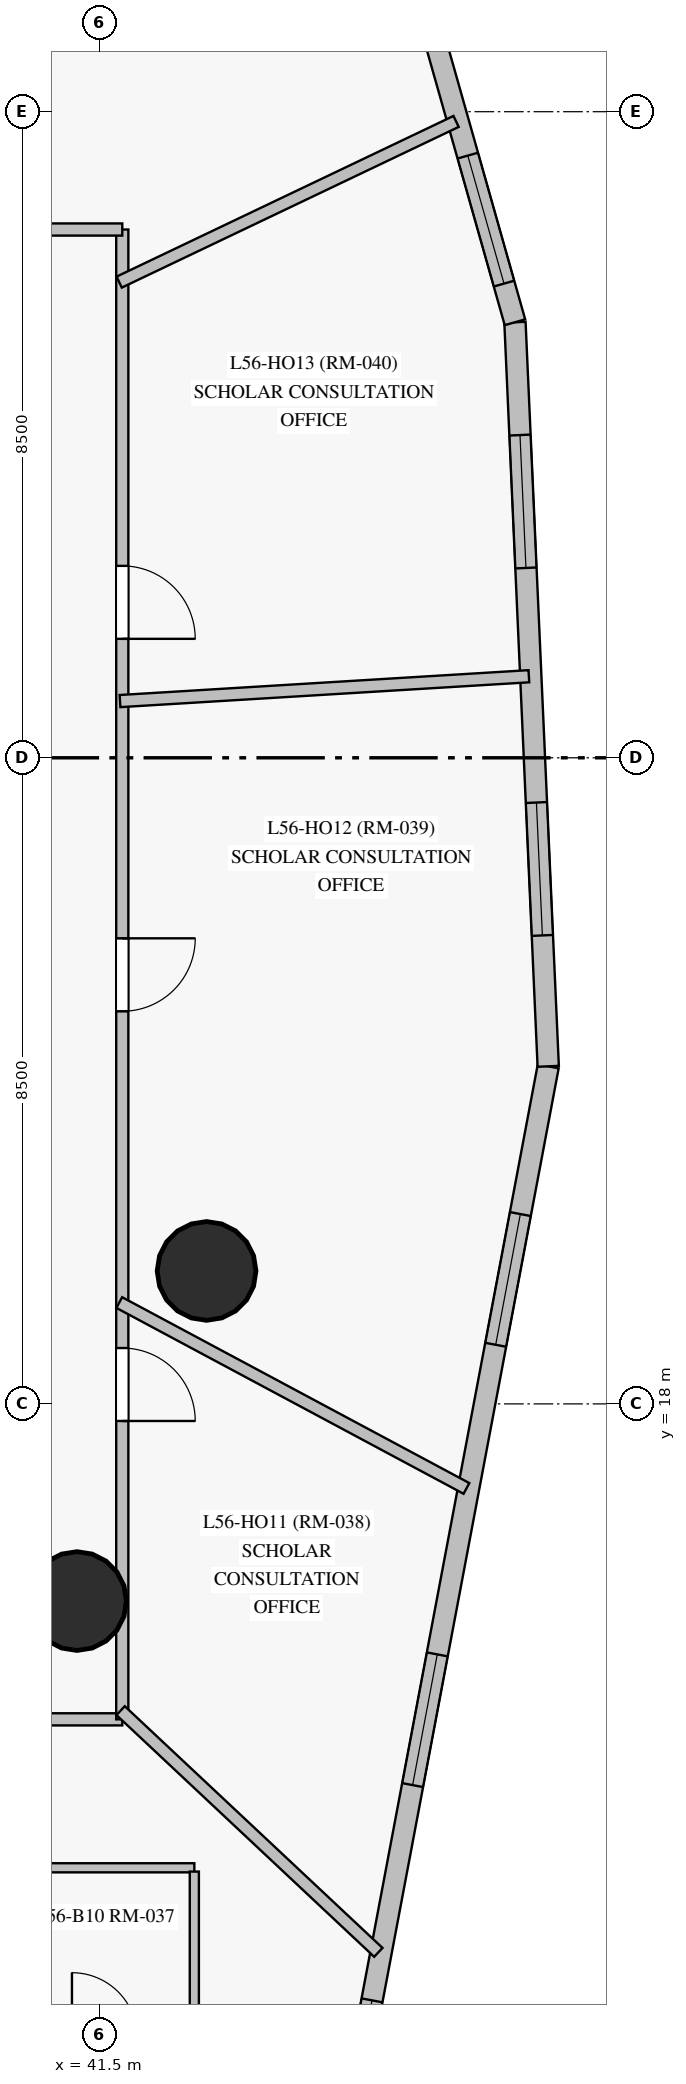
"""IFC4 building model, lengths in metres.
Left out: names, types, materials, properties, quantities, classifications, styles, units other than length and angle.
Written with IfcOpenShell. Run it as: python <this file> out.ifc"""

import sys

from ifc_helpers import new_model, si_unit, direction, frame, frame_2d, origin, origin_with_axes, origin_2d, place, context, subcontext, project, spatial, rectangle, circle, extrude, source, transform, mapped, element, fill, save


model = new_model("IFC4")
c1 = context("Model", 3, precision=1e-05, world=origin(), true_north=direction((0.0, 1.0)))
c2 = subcontext(c1, "Body", "Model", "MODEL_VIEW")
j1 = project(units=[si_unit("LENGTHUNIT", "METRE"), si_unit("PLANEANGLEUNIT", "RADIAN")], contexts=[c1])
p1 = place(None, origin())
s1 = spatial("IfcSite", under=j1, at=p1, CompositionType="ELEMENT")
p2 = place(p1, origin())
s2 = spatial("IfcBuilding", under=s1, at=p2, CompositionType="ELEMENT")
p3 = place(p2, frame((0.0, 0.0, 193.15)))
s3 = spatial("IfcBuildingStorey", under=s2, at=p3, CompositionType="ELEMENT", Elevation=193.15)
m1 = source(origin_with_axes(), c2, "Body", "SweptSolid", [
    extrude(circle(Radius=0.65, at=origin_2d()), origin(), (0.0, 0.0, 1.0), 3.05),
])
for number, where, z_axis, x_axis in (
    (1, (42.909, 19.749, 0.0), (0.0, 0.0, 1.0), (1.0, 0.0, 0.0)),
    (2, (41.204, 15.406, 0.0), (0.0, 0.0, 1.0), (1.0, 0.0, 0.0)),
):
    element("IfcColumn", number, at=place(p3, frame(where, z_axis=z_axis, x_axis=x_axis)), inside=s3, PredefinedType="COLUMN", context=c2, shape_type="MappedRepresentation", body=[
        mapped(m1, transform((0.0, 0.0, 0.0), scale=1.0)),
    ])
p4 = place(p3, frame((44.777, 8.517, 0.0), z_axis=(0.0, 0.0, 1.0), x_axis=(0.185389024618, 0.982665207256, 0.0)))
e3 = element("IfcWall", 3, at=p4, inside=s3, PredefinedType="SOLIDWALL", context=c2, shape_type="SweptSolid", body=[
    extrude(rectangle(XDim=14.17, YDim=0.28, at=frame_2d((7.085, 0.0))), origin(), (0.0, 0.0, 1.0), 2.825),
])
p5 = place(p4, frame((0.715, 0.0, 0.85)))
e4 = element("IfcOpeningElement", 4, at=p5, cuts=e3, PredefinedType="OPENING", context=c2, shape_type="SweptSolid", body=[
    extrude(rectangle(XDim=0.95, YDim=1.5, at=frame_2d((0.475, 0.75))), frame((0.0, 0.15, 0.0), z_axis=(0.0, -1.0, 0.0), x_axis=(1.0, 0.0, 0.0)), (0.0, 0.0, 1.0), 0.3),
])
p6 = place(p4, frame((4.547, 0.0, 0.85)))
e5 = element("IfcOpeningElement", 5, at=p6, cuts=e3, PredefinedType="OPENING", context=c2, shape_type="SweptSolid", body=[
    extrude(rectangle(XDim=1.75, YDim=1.65, at=frame_2d((0.875, 0.825))), frame((0.0, 0.15, 0.0), z_axis=(0.0, -1.0, 0.0), x_axis=(1.0, 0.0, 0.0)), (0.0, 0.0, 1.0), 0.3),
])
p7 = place(p4, frame((10.442, 0.0, 0.85)))
e6 = element("IfcOpeningElement", 6, at=p7, cuts=e3, PredefinedType="OPENING", context=c2, shape_type="SweptSolid", body=[
    extrude(rectangle(XDim=1.75, YDim=1.65, at=frame_2d((0.875, 0.825))), frame((0.0, 0.15, 0.0), z_axis=(0.0, -1.0, 0.0), x_axis=(1.0, 0.0, 0.0)), (0.0, 0.0, 1.0), 0.3),
])
p8 = place(p3, frame((47.404, 22.441, 0.0), z_axis=(0.0, 0.0, 1.0), x_axis=(-0.044674146158, 0.999001611943, 0.0)))
e7 = element("IfcWall", 7, at=p8, inside=s3, PredefinedType="SOLIDWALL", context=c2, shape_type="SweptSolid", body=[
    extrude(rectangle(XDim=9.799, YDim=0.28, at=frame_2d((4.899, 0.0))), origin(), (0.0, 0.0, 1.0), 2.825),
])
p9 = place(p8, frame((1.724, 0.0, 0.85)))
e8 = element("IfcOpeningElement", 8, at=p9, cuts=e7, PredefinedType="OPENING", context=c2, shape_type="SweptSolid", body=[
    extrude(rectangle(XDim=1.75, YDim=1.65, at=frame_2d((0.875, 0.825))), frame((0.0, 0.15, 0.0), z_axis=(0.0, -1.0, 0.0), x_axis=(1.0, 0.0, 0.0)), (0.0, 0.0, 1.0), 0.3),
])
p10 = place(p8, frame((6.563, 0.0, 0.85)))
e9 = element("IfcOpeningElement", 9, at=p10, cuts=e7, PredefinedType="OPENING", context=c2, shape_type="SweptSolid", body=[
    extrude(rectangle(XDim=1.75, YDim=1.65, at=frame_2d((0.875, 0.825))), frame((0.0, 0.15, 0.0), z_axis=(0.0, -1.0, 0.0), x_axis=(1.0, 0.0, 0.0)), (0.0, 0.0, 1.0), 0.3),
])
p11 = place(p3, frame((46.966, 32.23, 0.0), z_axis=(0.0, 0.0, 1.0), x_axis=(-0.272329993082, 0.96220391543, 0.0)))
e10 = element("IfcWall", 10, at=p11, inside=s3, PredefinedType="SOLIDWALL", context=c2, shape_type="SweptSolid", body=[
    extrude(rectangle(XDim=8.499, YDim=0.28, at=frame_2d((4.25, 0.0))), origin(), (0.0, 0.0, 1.0), 2.825),
])
p12 = place(p11, frame((0.529, 0.0, 0.85)))
e11 = element("IfcOpeningElement", 11, at=p12, cuts=e10, PredefinedType="OPENING", context=c2, shape_type="SweptSolid", body=[
    extrude(rectangle(XDim=1.75, YDim=1.65, at=frame_2d((0.875, 0.825))), frame((0.0, 0.15, 0.0), z_axis=(0.0, -1.0, 0.0), x_axis=(1.0, 0.0, 0.0)), (0.0, 0.0, 1.0), 0.3),
])
p13 = place(p11, frame((4.718, 0.0, 0.85)))
e12 = element("IfcOpeningElement", 12, at=p13, cuts=e10, PredefinedType="OPENING", context=c2, shape_type="SweptSolid", body=[
    extrude(rectangle(XDim=1.75, YDim=1.65, at=frame_2d((0.875, 0.825))), frame((0.0, 0.15, 0.0), z_axis=(0.0, -1.0, 0.0), x_axis=(1.0, 0.0, 0.0)), (0.0, 0.0, 1.0), 0.3),
])
p14 = place(p3, frame((41.8, 13.85, 0.0), z_axis=(0.0, 0.0, 1.0), x_axis=(-1.0, 0.0, 0.0)))
e13 = element("IfcWall", 13, at=p14, inside=s3, PredefinedType="PARTITIONING", context=c2, shape_type="SweptSolid", body=[
    extrude(rectangle(XDim=25.05, YDim=0.16, at=frame_2d((12.525, 0.0))), origin(), (0.0, 0.0, 1.0), 2.275),
])
p15 = place(p14, frame((5.788, 0.0, 0.0)))
e14 = element("IfcOpeningElement", 14, at=p15, cuts=e13, PredefinedType="OPENING", context=c2, shape_type="SweptSolid", body=[
    extrude(rectangle(XDim=0.96, YDim=2.15, at=frame_2d((0.48, 1.075))), frame((0.0, 0.09, 0.0), z_axis=(0.0, -1.0, 0.0), x_axis=(1.0, 0.0, 0.0)), (0.0, 0.0, 1.0), 0.18),
])
p16 = place(p14, frame((18.802, 0.0, 0.0)))
e15 = element("IfcOpeningElement", 15, at=p16, cuts=e13, PredefinedType="OPENING", context=c2, shape_type="SweptSolid", body=[
    extrude(rectangle(XDim=0.96, YDim=2.15, at=frame_2d((0.48, 1.075))), frame((0.0, 0.09, 0.0), z_axis=(0.0, -1.0, 0.0), x_axis=(1.0, 0.0, 0.0)), (0.0, 0.0, 1.0), 0.18),
])
p17 = place(p14, frame((15.808, 0.0, 0.0)))
e16 = element("IfcOpeningElement", 16, at=p17, cuts=e13, PredefinedType="OPENING", context=c2, shape_type="SweptSolid", body=[
    extrude(rectangle(XDim=0.96, YDim=2.15, at=frame_2d((0.48, 1.075))), frame((0.0, 0.09, 0.0), z_axis=(0.0, -1.0, 0.0), x_axis=(1.0, 0.0, 0.0)), (0.0, 0.0, 1.0), 0.18),
])
p18 = place(p14, frame((13.26, 0.0, 0.0)))
e17 = element("IfcOpeningElement", 17, at=p18, cuts=e13, PredefinedType="OPENING", context=c2, shape_type="SweptSolid", body=[
    extrude(rectangle(XDim=0.96, YDim=2.15, at=frame_2d((0.48, 1.075))), frame((0.0, 0.09, 0.0), z_axis=(0.0, -1.0, 0.0), x_axis=(1.0, 0.0, 0.0)), (0.0, 0.0, 1.0), 0.18),
])
p19 = place(p14, frame((11.46, 0.0, 0.0)))
e18 = element("IfcOpeningElement", 18, at=p19, cuts=e13, PredefinedType="OPENING", context=c2, shape_type="SweptSolid", body=[
    extrude(rectangle(XDim=0.96, YDim=2.15, at=frame_2d((0.48, 1.075))), frame((0.0, 0.09, 0.0), z_axis=(0.0, -1.0, 0.0), x_axis=(1.0, 0.0, 0.0)), (0.0, 0.0, 1.0), 0.18),
])
p20 = place(p14, frame((8.202, 0.0, 0.0)))
e19 = element("IfcOpeningElement", 19, at=p20, cuts=e13, PredefinedType="OPENING", context=c2, shape_type="SweptSolid", body=[
    extrude(rectangle(XDim=0.96, YDim=2.15, at=frame_2d((0.48, 1.075))), frame((0.0, 0.09, 0.0), z_axis=(0.0, -1.0, 0.0), x_axis=(1.0, 0.0, 0.0)), (0.0, 0.0, 1.0), 0.18),
])
p21 = place(p3, frame((41.8, 33.45, 0.0), z_axis=(0.0, 0.0, 1.0), x_axis=(0.0, -1.0, 0.0)))
e20 = element("IfcWall", 20, at=p21, inside=s3, PredefinedType="PARTITIONING", context=c2, shape_type="SweptSolid", body=[
    extrude(rectangle(XDim=19.6, YDim=0.16, at=frame_2d((9.8, 0.0))), origin(), (0.0, 0.0, 1.0), 2.275),
])
p22 = place(p21, frame((14.715, 0.0, 0.0)))
e21 = element("IfcOpeningElement", 21, at=p22, cuts=e20, PredefinedType="OPENING", context=c2, shape_type="SweptSolid", body=[
    extrude(rectangle(XDim=0.96, YDim=2.15, at=frame_2d((0.48, 1.075))), frame((0.0, 0.09, 0.0), z_axis=(0.0, -1.0, 0.0), x_axis=(1.0, 0.0, 0.0)), (0.0, 0.0, 1.0), 0.18),
])
p23 = place(p21, frame((9.325, 0.0, 0.0)))
e22 = element("IfcOpeningElement", 22, at=p23, cuts=e20, PredefinedType="OPENING", context=c2, shape_type="SweptSolid", body=[
    extrude(rectangle(XDim=0.96, YDim=2.15, at=frame_2d((0.48, 1.075))), frame((0.0, 0.09, 0.0), z_axis=(0.0, -1.0, 0.0), x_axis=(1.0, 0.0, 0.0)), (0.0, 0.0, 1.0), 0.18),
])
p24 = place(p21, frame((4.425, 0.0, 0.0)))
e23 = element("IfcOpeningElement", 23, at=p24, cuts=e20, PredefinedType="OPENING", context=c2, shape_type="SweptSolid", body=[
    extrude(rectangle(XDim=0.96, YDim=2.15, at=frame_2d((0.48, 1.075))), frame((0.0, 0.09, 0.0), z_axis=(0.0, -1.0, 0.0), x_axis=(1.0, 0.0, 0.0)), (0.0, 0.0, 1.0), 0.18),
])
p25 = place(p3, frame((41.77, 27.246, 0.0), z_axis=(0.0, 0.0, 1.0), x_axis=(0.998158619136, 0.060657819326, 0.0)))
e24 = element("IfcWall", 24, at=p25, inside=s3, PredefinedType="PARTITIONING", context=c2, shape_type="SweptSolid", body=[
    extrude(rectangle(XDim=5.389, YDim=0.16, at=frame_2d((2.695, 0.0))), origin(), (0.0, 0.0, 1.0), 2.825),
])
p26 = place(p3, frame((41.76, 19.333, 0.0), z_axis=(0.0, 0.0, 1.0), x_axis=(0.881620046082, -0.471959843998, 0.0)))
e25 = element("IfcWall", 25, at=p26, inside=s3, PredefinedType="PARTITIONING", context=c2, shape_type="SweptSolid", body=[
    extrude(rectangle(XDim=5.181, YDim=0.16, at=frame_2d((2.59, 0.0))), origin(), (0.0, 0.0, 1.0), 2.275),
])
p27 = place(p3, frame((41.76, 32.758, 0.0), z_axis=(0.0, 0.0, 1.0), x_axis=(0.902576335981, 0.430529856952, 0.0)))
e26 = element("IfcWall", 26, at=p27, inside=s3, PredefinedType="PARTITIONING", context=c2, shape_type="SweptSolid", body=[
    extrude(rectangle(XDim=4.91, YDim=0.16, at=frame_2d((2.455, 0.0))), origin(), (0.0, 0.0, 1.0), 2.825),
])
p28 = place(p3, frame((41.778, 13.965, 0.0), z_axis=(0.0, 0.0, 1.0), x_axis=(0.729404533872, -0.684082616331, 0.0)))
e27 = element("IfcWall", 27, at=p28, inside=s3, PredefinedType="PARTITIONING", context=c2, shape_type="SweptSolid", body=[
    extrude(rectangle(XDim=4.649, YDim=0.16, at=frame_2d((2.324, 0.0))), origin(), (0.0, 0.0, 1.0), 2.825),
])
p29 = place(p3, frame((37.707, 33.45, 0.0), z_axis=(0.0, 0.0, 1.0), x_axis=(1.0, 0.0, 0.0)))
e28 = element("IfcWall", 28, at=p29, inside=s3, PredefinedType="PARTITIONING", context=c2, shape_type="SweptSolid", body=[
    extrude(rectangle(XDim=4.093, YDim=0.16, at=frame_2d((2.046, 0.0))), origin(), (0.0, 0.0, 1.0), 2.825),
])
p30 = place(p3, frame((42.748, 11.897, 0.0), z_axis=(0.0, 0.0, 1.0), x_axis=(-1.0, 0.0, 0.0)))
e29 = element("IfcWall", 29, at=p30, inside=s3, PredefinedType="PARTITIONING", context=c2, shape_type="SweptSolid", body=[
    extrude(rectangle(XDim=2.36, YDim=0.12, at=frame_2d((1.18, 0.0))), origin(), (0.0, 0.0, 1.0), 2.825),
])
p31 = place(p3, frame((42.748, 9.707, 0.0), z_axis=(0.0, 0.0, 1.0), x_axis=(0.0, 1.0, 0.0)))
e30 = element("IfcWall", 30, at=p31, inside=s3, PredefinedType="PARTITIONING", context=c2, shape_type="SweptSolid", body=[
    extrude(rectangle(XDim=2.14, YDim=0.12, at=frame_2d((1.07, 0.0))), origin(), (0.0, 0.0, 1.0), 2.825),
])
m2 = source(origin_with_axes(), c2, "Body", "SweptSolid", [
    extrude(rectangle(XDim=0.95, YDim=1.5, at=frame_2d((0.475, 0.75))), frame((0.0, 0.03, 0.0), z_axis=(0.0, -1.0, 0.0), x_axis=(1.0, 0.0, 0.0)), (0.0, 0.0, 1.0), 0.06),
])
p32 = place(p5, origin())
e31 = element("IfcWindow", 31, at=p32, inside=s3, PartitioningType="SINGLE_PANEL", PredefinedType="WINDOW", context=c2, shape_type="MappedRepresentation", body=[
    mapped(m2, transform((0.0, 0.0, 0.0), scale=1.0)),
])
fill(e4, e31)
m3 = source(origin_with_axes(), c2, "Body", "SweptSolid", [
    extrude(rectangle(XDim=1.75, YDim=1.65, at=frame_2d((0.875, 0.825))), frame((0.0, 0.03, 0.0), z_axis=(0.0, -1.0, 0.0), x_axis=(1.0, 0.0, 0.0)), (0.0, 0.0, 1.0), 0.06),
])
p33 = place(p6, origin())
e32 = element("IfcWindow", 32, at=p33, inside=s3, PartitioningType="SINGLE_PANEL", PredefinedType="WINDOW", context=c2, shape_type="MappedRepresentation", body=[
    mapped(m3, transform((0.0, 0.0, 0.0), scale=1.0)),
])
fill(e5, e32)
p34 = place(p7, origin())
e33 = element("IfcWindow", 33, at=p34, inside=s3, PartitioningType="SINGLE_PANEL", PredefinedType="WINDOW", context=c2, shape_type="MappedRepresentation", body=[
    mapped(m3, transform((0.0, 0.0, 0.0), scale=1.0)),
])
fill(e6, e33)
p35 = place(p9, origin())
e34 = element("IfcWindow", 34, at=p35, inside=s3, PartitioningType="SINGLE_PANEL", PredefinedType="WINDOW", context=c2, shape_type="MappedRepresentation", body=[
    mapped(m3, transform((0.0, 0.0, 0.0), scale=1.0)),
])
fill(e8, e34)
p36 = place(p10, origin())
e35 = element("IfcWindow", 35, at=p36, inside=s3, PartitioningType="SINGLE_PANEL", PredefinedType="WINDOW", context=c2, shape_type="MappedRepresentation", body=[
    mapped(m3, transform((0.0, 0.0, 0.0), scale=1.0)),
])
fill(e9, e35)
p37 = place(p12, origin())
e36 = element("IfcWindow", 36, at=p37, inside=s3, PartitioningType="SINGLE_PANEL", PredefinedType="WINDOW", context=c2, shape_type="MappedRepresentation", body=[
    mapped(m3, transform((0.0, 0.0, 0.0), scale=1.0)),
])
fill(e11, e36)
m4 = source(origin_with_axes(), c2, "Body", "SweptSolid", [
    extrude(rectangle(XDim=0.96, YDim=2.15, at=frame_2d((0.48, 1.075))), frame((0.0, 0.025, 0.0), z_axis=(0.0, -1.0, 0.0), x_axis=(1.0, 0.0, 0.0)), (0.0, 0.0, 1.0), 0.05),
])
p38 = place(p22, origin())
e37 = element("IfcDoor", 37, at=p38, inside=s3, OperationType="SINGLE_SWING_RIGHT", PredefinedType="DOOR", context=c2, shape_type="MappedRepresentation", body=[
    mapped(m4, transform((0.0, 0.0, 0.0), scale=1.0)),
])
fill(e21, e37)
p39 = place(p23, origin())
e38 = element("IfcDoor", 38, at=p39, inside=s3, OperationType="SINGLE_SWING_LEFT", PredefinedType="DOOR", context=c2, shape_type="MappedRepresentation", body=[
    mapped(m4, transform((0.0, 0.0, 0.0), scale=1.0)),
])
fill(e22, e38)
p40 = place(p24, origin())
e39 = element("IfcDoor", 39, at=p40, inside=s3, OperationType="SINGLE_SWING_RIGHT", PredefinedType="DOOR", context=c2, shape_type="MappedRepresentation", body=[
    mapped(m4, transform((0.0, 0.0, 0.0), scale=1.0)),
])
fill(e23, e39)
save(model, sys.argv[1])
